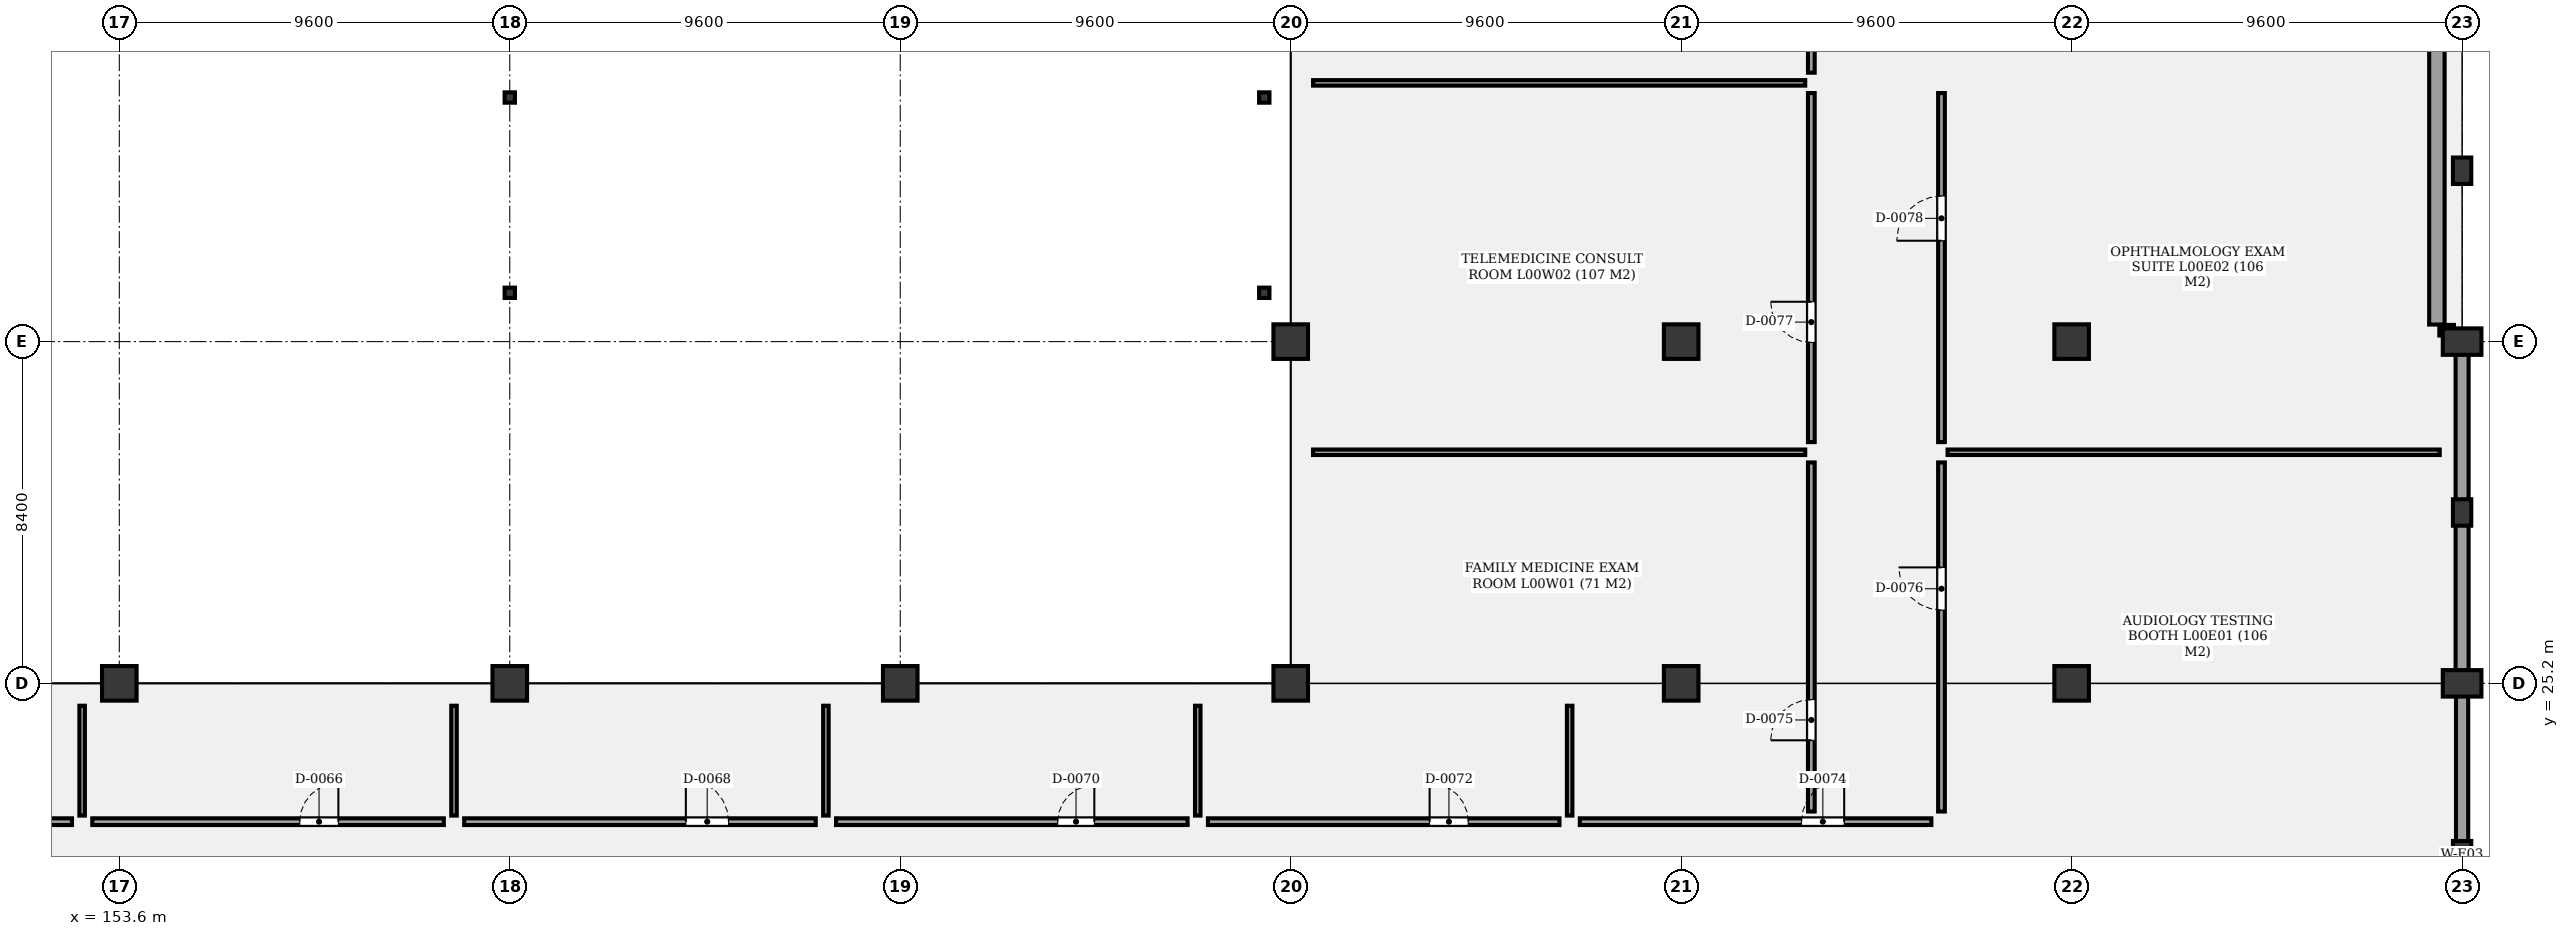
"""IFC4 building model, lengths in metres.
Left out: names, types, materials, properties, quantities, classifications, styles, units other than length and angle.
Written with IfcOpenShell. Run it as: python <this file> out.ifc"""

import sys

from ifc_helpers import new_model, si_unit, direction, frame, frame_2d, origin, origin_2d, place, context, subcontext, project, spatial, rectangle, hollow_rectangle, extrude, element, fill, save


model = new_model("IFC4")
c1 = context("Model", 3, precision=1e-05, world=origin(), true_north=direction((0.0, 1.0)))
c2 = subcontext(c1, "Body", "Model", "MODEL_VIEW")
j1 = project(units=[si_unit("LENGTHUNIT", "METRE"), si_unit("PLANEANGLEUNIT", "RADIAN")], contexts=[c1])
p1 = place(None, origin())
s1 = spatial("IfcSite", under=j1, at=p1, CompositionType="ELEMENT")
p2 = place(p1, origin())
s2 = spatial("IfcBuilding", under=s1, at=p2, CompositionType="ELEMENT")
p3 = place(p2, origin())
s3 = spatial("IfcBuildingStorey", under=s2, at=p3, CompositionType="ELEMENT", Elevation=0.0)
for number, where, z_axis, x_axis in (
    (1, (153.6, 25.2, -0.35), (0.0, 0.0, 1.0), (1.0, 0.0, 0.0)),
    (2, (163.2, 25.2, -0.35), (0.0, 0.0, 1.0), (1.0, 0.0, 0.0)),
):
    element("IfcColumn", number, at=place(p3, frame(where, z_axis=z_axis, x_axis=x_axis)), inside=s3, PredefinedType="COLUMN", context=c2, shape_type="SweptSolid", body=[
        extrude(rectangle(XDim=0.85, YDim=0.85, at=origin_2d()), origin(), (0.0, 0.0, 1.0), 5.45),
    ])
for number, where, z_axis, x_axis in (
    (3, (163.2, 34.8, -0.35), (0.0, 0.0, 1.0), (1.0, 0.0, 0.0)),
    (4, (163.2, 39.6, -0.35), (0.0, 0.0, 1.0), (1.0, 0.0, 0.0)),
):
    element("IfcColumn", number, at=place(p3, frame(where, z_axis=z_axis, x_axis=x_axis)), inside=s3, PredefinedType="COLUMN", context=c2, shape_type="SweptSolid", body=[
        extrude(hollow_rectangle(XDim=0.254, YDim=0.254, WallThickness=0.013, at=origin_2d()), origin(), (0.0, 0.0, 1.0), 5.45),
    ])
p4 = place(p3, frame((172.8, 25.2, -0.35), z_axis=(0.0, 0.0, 1.0), x_axis=(1.0, 0.0, 0.0)))
e5 = element("IfcColumn", 5, at=p4, inside=s3, PredefinedType="COLUMN", context=c2, shape_type="SweptSolid", body=[
    extrude(rectangle(XDim=0.85, YDim=0.85, at=origin_2d()), origin(), (0.0, 0.0, 1.0), 5.45),
])
for number, where, z_axis, x_axis in (
    (6, (181.75, 34.8, -0.35), (0.0, 0.0, 1.0), (1.0, 0.0, 0.0)),
    (7, (181.75, 39.6, -0.35), (0.0, 0.0, 1.0), (1.0, 0.0, 0.0)),
):
    element("IfcColumn", number, at=place(p3, frame(where, z_axis=z_axis, x_axis=x_axis)), inside=s3, PredefinedType="COLUMN", context=c2, shape_type="SweptSolid", body=[
        extrude(hollow_rectangle(XDim=0.254, YDim=0.254, WallThickness=0.013, at=origin_2d()), origin(), (0.0, 0.0, 1.0), 5.45),
    ])
for number, where, z_axis, x_axis in (
    (8, (182.4, 25.2, -0.35), (0.0, 0.0, 1.0), (1.0, 0.0, 0.0)),
    (9, (182.4, 33.6, -0.35), (0.0, 0.0, 1.0), (1.0, 0.0, 0.0)),
    (10, (192.0, 25.2, -0.35), (0.0, 0.0, 1.0), (1.0, 0.0, 0.0)),
    (11, (192.0, 33.6, -0.35), (0.0, 0.0, 1.0), (1.0, 0.0, 0.0)),
    (12, (201.6, 25.2, -0.35), (0.0, 0.0, 1.0), (1.0, 0.0, 0.0)),
    (13, (201.6, 33.6, -0.35), (0.0, 0.0, 1.0), (1.0, 0.0, 0.0)),
):
    element("IfcColumn", number, at=place(p3, frame(where, z_axis=z_axis, x_axis=x_axis)), inside=s3, PredefinedType="COLUMN", context=c2, shape_type="SweptSolid", body=[
        extrude(rectangle(XDim=0.85, YDim=0.85, at=origin_2d()), origin(), (0.0, 0.0, 1.0), 5.45),
    ])
for number, where, z_axis, x_axis in (
    (14, (211.2, 25.2, -0.35), (0.0, 0.0, 1.0), (0.0, 1.0, 0.0)),
    (15, (211.2, 33.6, -0.35), (0.0, 0.0, 1.0), (0.0, 1.0, 0.0)),
):
    element("IfcColumn", number, at=place(p3, frame(where, z_axis=z_axis, x_axis=x_axis)), inside=s3, PredefinedType="COLUMN", context=c2, shape_type="SweptSolid", body=[
        extrude(rectangle(XDim=0.95, YDim=0.65, at=origin_2d()), origin(), (0.0, 0.0, 1.0), 5.45),
    ])
for number, where, z_axis, x_axis in (
    (16, (211.2, 21.0, 0.0), (0.0, 0.0, 1.0), (1.0, 0.0, 0.0)),
    (17, (211.2, 29.4, 0.0), (0.0, 0.0, 1.0), (1.0, 0.0, 0.0)),
    (18, (211.2, 37.8, 0.0), (0.0, 0.0, 1.0), (1.0, 0.0, 0.0)),
):
    element("IfcColumn", number, at=place(p3, frame(where, z_axis=z_axis, x_axis=x_axis)), inside=s3, PredefinedType="PILASTER", context=c2, shape_type="SweptSolid", body=[
        extrude(rectangle(XDim=0.45, YDim=0.65, at=origin_2d()), origin(), (0.0, 0.0, 1.0), 5.1),
    ])
p5 = place(p3, frame((211.2, 25.2, 0.0), z_axis=(0.0, 0.0, 1.0), x_axis=(0.0, -1.0, 0.0)))
e19 = element("IfcWall", 19, at=p5, inside=s3, PredefinedType="SOLIDWALL", context=c2, shape_type="SweptSolid", body=[
    extrude(rectangle(XDim=8.4, YDim=0.3, at=frame_2d((4.2, 0.0))), origin(), (0.0, 0.0, 1.0), 4.24),
])
p6 = place(p3, frame((211.2, 33.6, 0.0), z_axis=(0.0, 0.0, 1.0), x_axis=(0.0, -1.0, 0.0)))
e20 = element("IfcWall", 20, at=p6, inside=s3, PredefinedType="SOLIDWALL", context=c2, shape_type="SweptSolid", body=[
    extrude(rectangle(XDim=8.4, YDim=0.32, at=frame_2d((4.2, 0.0))), origin(), (0.0, 0.0, 1.0), 4.24),
])
p7 = place(p3, frame((211.0, 33.88, 0.0), z_axis=(0.0, 0.0, 1.0), x_axis=(-1.0, 0.0, 0.0)))
e21 = element("IfcWall", 21, at=p7, inside=s3, PredefinedType="SOLIDWALL", context=c2, shape_type="SweptSolid", body=[
    extrude(rectangle(XDim=0.36, YDim=0.26, at=frame_2d((0.18, 0.0))), origin(), (0.0, 0.0, 1.0), 4.24),
])
p8 = place(p3, frame((210.58, 41.58, 0.0), z_axis=(0.0, 0.0, 1.0), x_axis=(0.0, -1.0, 0.0)))
e22 = element("IfcWall", 22, at=p8, inside=s3, PredefinedType="SOLIDWALL", context=c2, shape_type="SweptSolid", body=[
    extrude(rectangle(XDim=7.56, YDim=0.38, at=frame_2d((3.78, 0.0))), origin(), (0.0, 0.0, 1.0), 4.24),
])
p9 = place(p3, frame((143.793, 21.8, 0.0), z_axis=(0.0, 0.0, 1.0), x_axis=(1.0, 0.0, 0.0)))
e23 = element("IfcWall", 23, at=p9, inside=s3, PredefinedType="PARTITIONING", context=c2, shape_type="SweptSolid", body=[
    extrude(rectangle(XDim=8.643, YDim=0.165, at=frame_2d((4.322, 0.0))), origin(), (0.0, 0.0, 1.0), 3.98),
])
p10 = place(p9, frame((4.75, 0.0, 0.0)))
e24 = element("IfcOpeningElement", 24, at=p10, cuts=e23, PredefinedType="OPENING", context=c2, shape_type="SweptSolid", body=[
    extrude(rectangle(XDim=0.9, YDim=2.1, at=frame_2d((0.45, 1.05))), frame((0.0, 0.093, 0.0), z_axis=(0.0, -1.0, 0.0), x_axis=(1.0, 0.0, 0.0)), (0.0, 0.0, 1.0), 0.185),
])
p11 = place(p3, frame((152.936, 21.8, 0.0), z_axis=(0.0, 0.0, 1.0), x_axis=(1.0, 0.0, 0.0)))
e25 = element("IfcWall", 25, at=p11, inside=s3, PredefinedType="PARTITIONING", context=c2, shape_type="SweptSolid", body=[
    extrude(rectangle(XDim=8.643, YDim=0.165, at=frame_2d((4.322, 0.0))), origin(), (0.0, 0.0, 1.0), 3.98),
])
p12 = place(p11, frame((5.1, 0.0, 0.0)))
e26 = element("IfcOpeningElement", 26, at=p12, cuts=e25, PredefinedType="OPENING", context=c2, shape_type="SweptSolid", body=[
    extrude(rectangle(XDim=0.95, YDim=2.1, at=frame_2d((0.475, 1.05))), frame((0.0, 0.093, 0.0), z_axis=(0.0, -1.0, 0.0), x_axis=(1.0, 0.0, 0.0)), (0.0, 0.0, 1.0), 0.185),
])
p13 = place(p3, frame((152.686, 21.95, 0.0), z_axis=(0.0, 0.0, 1.0), x_axis=(0.0, 1.0, 0.0)))
e27 = element("IfcWall", 27, at=p13, inside=s3, PredefinedType="PARTITIONING", context=c2, shape_type="SweptSolid", body=[
    extrude(rectangle(XDim=2.7, YDim=0.135, at=frame_2d((1.35, 0.0))), origin(), (0.0, 0.0, 1.0), 3.98),
])
p14 = place(p3, frame((162.079, 21.8, 0.0), z_axis=(0.0, 0.0, 1.0), x_axis=(1.0, 0.0, 0.0)))
e28 = element("IfcWall", 28, at=p14, inside=s3, PredefinedType="PARTITIONING", context=c2, shape_type="SweptSolid", body=[
    extrude(rectangle(XDim=8.643, YDim=0.165, at=frame_2d((4.321, 0.0))), origin(), (0.0, 0.0, 1.0), 3.98),
])
p15 = place(p14, frame((5.45, 0.0, 0.0)))
e29 = element("IfcOpeningElement", 29, at=p15, cuts=e28, PredefinedType="OPENING", context=c2, shape_type="SweptSolid", body=[
    extrude(rectangle(XDim=1.05, YDim=2.1, at=frame_2d((0.525, 1.05))), frame((0.0, 0.093, 0.0), z_axis=(0.0, -1.0, 0.0), x_axis=(1.0, 0.0, 0.0)), (0.0, 0.0, 1.0), 0.185),
])
p16 = place(p3, frame((161.829, 21.95, 0.0), z_axis=(0.0, 0.0, 1.0), x_axis=(0.0, 1.0, 0.0)))
e30 = element("IfcWall", 30, at=p16, inside=s3, PredefinedType="PARTITIONING", context=c2, shape_type="SweptSolid", body=[
    extrude(rectangle(XDim=2.7, YDim=0.135, at=frame_2d((1.35, 0.0))), origin(), (0.0, 0.0, 1.0), 3.98),
])
p17 = place(p3, frame((171.222, 21.8, 0.0), z_axis=(0.0, 0.0, 1.0), x_axis=(1.0, 0.0, 0.0)))
e31 = element("IfcWall", 31, at=p17, inside=s3, PredefinedType="PARTITIONING", context=c2, shape_type="SweptSolid", body=[
    extrude(rectangle(XDim=8.643, YDim=0.165, at=frame_2d((4.322, 0.0))), origin(), (0.0, 0.0, 1.0), 3.98),
])
p18 = place(p17, frame((5.45, 0.0, 0.0)))
e32 = element("IfcOpeningElement", 32, at=p18, cuts=e31, PredefinedType="OPENING", context=c2, shape_type="SweptSolid", body=[
    extrude(rectangle(XDim=0.9, YDim=2.1, at=frame_2d((0.45, 1.05))), frame((0.0, 0.093, 0.0), z_axis=(0.0, -1.0, 0.0), x_axis=(1.0, 0.0, 0.0)), (0.0, 0.0, 1.0), 0.185),
])
p19 = place(p3, frame((170.972, 21.95, 0.0), z_axis=(0.0, 0.0, 1.0), x_axis=(0.0, 1.0, 0.0)))
e33 = element("IfcWall", 33, at=p19, inside=s3, PredefinedType="PARTITIONING", context=c2, shape_type="SweptSolid", body=[
    extrude(rectangle(XDim=2.7, YDim=0.135, at=frame_2d((1.35, 0.0))), origin(), (0.0, 0.0, 1.0), 3.98),
])
p20 = place(p3, frame((180.365, 21.8, 0.0), z_axis=(0.0, 0.0, 1.0), x_axis=(1.0, 0.0, 0.0)))
e34 = element("IfcWall", 34, at=p20, inside=s3, PredefinedType="PARTITIONING", context=c2, shape_type="SweptSolid", body=[
    extrude(rectangle(XDim=8.643, YDim=0.165, at=frame_2d((4.322, 0.0))), origin(), (0.0, 0.0, 1.0), 3.98),
])
p21 = place(p20, frame((5.45, 0.0, 0.0)))
e35 = element("IfcOpeningElement", 35, at=p21, cuts=e34, PredefinedType="OPENING", context=c2, shape_type="SweptSolid", body=[
    extrude(rectangle(XDim=0.95, YDim=2.1, at=frame_2d((0.475, 1.05))), frame((0.0, 0.093, 0.0), z_axis=(0.0, -1.0, 0.0), x_axis=(1.0, 0.0, 0.0)), (0.0, 0.0, 1.0), 0.185),
])
p22 = place(p3, frame((180.115, 21.95, 0.0), z_axis=(0.0, 0.0, 1.0), x_axis=(0.0, 1.0, 0.0)))
e36 = element("IfcWall", 36, at=p22, inside=s3, PredefinedType="PARTITIONING", context=c2, shape_type="SweptSolid", body=[
    extrude(rectangle(XDim=2.7, YDim=0.135, at=frame_2d((1.35, 0.0))), origin(), (0.0, 0.0, 1.0), 3.98),
])
p23 = place(p3, frame((189.508, 21.8, 0.0), z_axis=(0.0, 0.0, 1.0), x_axis=(1.0, 0.0, 0.0)))
e37 = element("IfcWall", 37, at=p23, inside=s3, PredefinedType="PARTITIONING", context=c2, shape_type="SweptSolid", body=[
    extrude(rectangle(XDim=8.643, YDim=0.165, at=frame_2d((4.321, 0.0))), origin(), (0.0, 0.0, 1.0), 3.98),
])
p24 = place(p23, frame((5.45, 0.0, 0.0)))
e38 = element("IfcOpeningElement", 38, at=p24, cuts=e37, PredefinedType="OPENING", context=c2, shape_type="SweptSolid", body=[
    extrude(rectangle(XDim=1.05, YDim=2.1, at=frame_2d((0.525, 1.05))), frame((0.0, 0.093, 0.0), z_axis=(0.0, -1.0, 0.0), x_axis=(1.0, 0.0, 0.0)), (0.0, 0.0, 1.0), 0.185),
])
p25 = place(p3, frame((189.258, 21.95, 0.0), z_axis=(0.0, 0.0, 1.0), x_axis=(0.0, 1.0, 0.0)))
e39 = element("IfcWall", 39, at=p25, inside=s3, PredefinedType="PARTITIONING", context=c2, shape_type="SweptSolid", body=[
    extrude(rectangle(XDim=2.7, YDim=0.135, at=frame_2d((1.35, 0.0))), origin(), (0.0, 0.0, 1.0), 3.98),
])
p26 = place(p3, frame((195.2, 22.05, 0.0), z_axis=(0.0, 0.0, 1.0), x_axis=(0.0, 1.0, 0.0)))
e40 = element("IfcWall", 40, at=p26, inside=s3, PredefinedType="PARTITIONING", context=c2, shape_type="SweptSolid", body=[
    extrude(rectangle(XDim=8.58, YDim=0.165, at=frame_2d((4.29, 0.0))), origin(), (0.0, 0.0, 1.0), 3.98),
])
p27 = place(p26, frame((1.75, 0.0, 0.0)))
e41 = element("IfcOpeningElement", 41, at=p27, cuts=e40, PredefinedType="OPENING", context=c2, shape_type="SweptSolid", body=[
    extrude(rectangle(XDim=1.0, YDim=2.1, at=frame_2d((0.5, 1.05))), frame((0.0, 0.093, 0.0), z_axis=(0.0, -1.0, 0.0), x_axis=(1.0, 0.0, 0.0)), (0.0, 0.0, 1.0), 0.185),
])
p28 = place(p3, frame((198.4, 22.05, 0.0), z_axis=(0.0, 0.0, 1.0), x_axis=(0.0, 1.0, 0.0)))
e42 = element("IfcWall", 42, at=p28, inside=s3, PredefinedType="PARTITIONING", context=c2, shape_type="SweptSolid", body=[
    extrude(rectangle(XDim=8.58, YDim=0.165, at=frame_2d((4.29, 0.0))), origin(), (0.0, 0.0, 1.0), 3.98),
])
p29 = place(p28, frame((4.95, 0.0, 0.0)))
e43 = element("IfcOpeningElement", 43, at=p29, cuts=e42, PredefinedType="OPENING", context=c2, shape_type="SweptSolid", body=[
    extrude(rectangle(XDim=1.05, YDim=2.1, at=frame_2d((0.525, 1.05))), frame((0.0, 0.093, 0.0), z_axis=(0.0, -1.0, 0.0), x_axis=(1.0, 0.0, 0.0)), (0.0, 0.0, 1.0), 0.185),
])
p30 = place(p3, frame((195.2, 31.13, 0.0), z_axis=(0.0, 0.0, 1.0), x_axis=(0.0, 1.0, 0.0)))
e44 = element("IfcWall", 44, at=p30, inside=s3, PredefinedType="PARTITIONING", context=c2, shape_type="SweptSolid", body=[
    extrude(rectangle(XDim=8.58, YDim=0.165, at=frame_2d((4.29, 0.0))), origin(), (0.0, 0.0, 1.0), 3.98),
])
p31 = place(p30, frame((2.45, 0.0, 0.0)))
e45 = element("IfcOpeningElement", 45, at=p31, cuts=e44, PredefinedType="OPENING", context=c2, shape_type="SweptSolid", body=[
    extrude(rectangle(XDim=1.0, YDim=2.2, at=frame_2d((0.5, 1.1))), frame((0.0, 0.093, 0.0), z_axis=(0.0, -1.0, 0.0), x_axis=(1.0, 0.0, 0.0)), (0.0, 0.0, 1.0), 0.185),
])
p32 = place(p3, frame((182.95, 30.88, 0.0), z_axis=(0.0, 0.0, 1.0), x_axis=(1.0, 0.0, 0.0)))
e46 = element("IfcWall", 46, at=p32, inside=s3, PredefinedType="PARTITIONING", context=c2, shape_type="SweptSolid", body=[
    extrude(rectangle(XDim=12.1, YDim=0.135, at=frame_2d((6.05, 0.0))), origin(), (0.0, 0.0, 1.0), 3.98),
])
p33 = place(p3, frame((198.4, 31.13, 0.0), z_axis=(0.0, 0.0, 1.0), x_axis=(0.0, 1.0, 0.0)))
e47 = element("IfcWall", 47, at=p33, inside=s3, PredefinedType="PARTITIONING", context=c2, shape_type="SweptSolid", body=[
    extrude(rectangle(XDim=8.58, YDim=0.165, at=frame_2d((4.29, 0.0))), origin(), (0.0, 0.0, 1.0), 3.98),
])
p34 = place(p33, frame((4.95, 0.0, 0.0)))
e48 = element("IfcOpeningElement", 48, at=p34, cuts=e47, PredefinedType="OPENING", context=c2, shape_type="SweptSolid", body=[
    extrude(rectangle(XDim=1.1, YDim=2.1, at=frame_2d((0.55, 1.05))), frame((0.0, 0.093, 0.0), z_axis=(0.0, -1.0, 0.0), x_axis=(1.0, 0.0, 0.0)), (0.0, 0.0, 1.0), 0.185),
])
p35 = place(p3, frame((198.55, 30.88, 0.0), z_axis=(0.0, 0.0, 1.0), x_axis=(1.0, 0.0, 0.0)))
e49 = element("IfcWall", 49, at=p35, inside=s3, PredefinedType="PARTITIONING", context=c2, shape_type="SweptSolid", body=[
    extrude(rectangle(XDim=12.1, YDim=0.135, at=frame_2d((6.05, 0.0))), origin(), (0.0, 0.0, 1.0), 3.98),
])
p36 = place(p3, frame((195.2, 40.21, 0.0), z_axis=(0.0, 0.0, 1.0), x_axis=(0.0, 1.0, 0.0)))
e50 = element("IfcWall", 50, at=p36, inside=s3, PredefinedType="PARTITIONING", context=c2, shape_type="SweptSolid", body=[
    extrude(rectangle(XDim=8.58, YDim=0.165, at=frame_2d((4.29, 0.0))), origin(), (0.0, 0.0, 1.0), 3.98),
])
p37 = place(p36, frame((2.45, 0.0, 0.0)))
e51 = element("IfcOpeningElement", 51, at=p37, cuts=e50, PredefinedType="OPENING", context=c2, shape_type="SweptSolid", body=[
    extrude(rectangle(XDim=1.0, YDim=2.1, at=frame_2d((0.5, 1.05))), frame((0.0, 0.093, 0.0), z_axis=(0.0, -1.0, 0.0), x_axis=(1.0, 0.0, 0.0)), (0.0, 0.0, 1.0), 0.185),
])
p38 = place(p3, frame((182.95, 39.96, 0.0), z_axis=(0.0, 0.0, 1.0), x_axis=(1.0, 0.0, 0.0)))
e52 = element("IfcWall", 52, at=p38, inside=s3, PredefinedType="PARTITIONING", context=c2, shape_type="SweptSolid", body=[
    extrude(rectangle(XDim=12.1, YDim=0.135, at=frame_2d((6.05, 0.0))), origin(), (0.0, 0.0, 1.0), 3.98),
])
p39 = place(p12, origin())
e53 = element("IfcDoor", 53, at=p39, inside=s3, OperationType="SINGLE_SWING_RIGHT", PredefinedType="DOOR", context=c2, shape_type="SweptSolid", body=[
    extrude(rectangle(XDim=0.95, YDim=2.1, at=frame_2d((0.475, 1.05))), frame((0.0, 0.025, 0.0), z_axis=(0.0, -1.0, 0.0), x_axis=(1.0, 0.0, 0.0)), (0.0, 0.0, 1.0), 0.05),
])
fill(e26, e53)
p40 = place(p15, origin())
e54 = element("IfcDoor", 54, at=p40, inside=s3, OperationType="SINGLE_SWING_LEFT", PredefinedType="DOOR", context=c2, shape_type="SweptSolid", body=[
    extrude(rectangle(XDim=1.05, YDim=2.1, at=frame_2d((0.525, 1.05))), frame((0.0, 0.025, 0.0), z_axis=(0.0, -1.0, 0.0), x_axis=(1.0, 0.0, 0.0)), (0.0, 0.0, 1.0), 0.05),
])
fill(e29, e54)
p41 = place(p18, origin())
e55 = element("IfcDoor", 55, at=p41, inside=s3, OperationType="SINGLE_SWING_RIGHT", PredefinedType="DOOR", context=c2, shape_type="SweptSolid", body=[
    extrude(rectangle(XDim=0.9, YDim=2.1, at=frame_2d((0.45, 1.05))), frame((0.0, 0.025, 0.0), z_axis=(0.0, -1.0, 0.0), x_axis=(1.0, 0.0, 0.0)), (0.0, 0.0, 1.0), 0.05),
])
fill(e32, e55)
p42 = place(p21, origin())
e56 = element("IfcDoor", 56, at=p42, inside=s3, OperationType="SINGLE_SWING_LEFT", PredefinedType="DOOR", context=c2, shape_type="SweptSolid", body=[
    extrude(rectangle(XDim=0.95, YDim=2.1, at=frame_2d((0.475, 1.05))), frame((0.0, 0.025, 0.0), z_axis=(0.0, -1.0, 0.0), x_axis=(1.0, 0.0, 0.0)), (0.0, 0.0, 1.0), 0.05),
])
fill(e35, e56)
p43 = place(p24, origin())
e57 = element("IfcDoor", 57, at=p43, inside=s3, OperationType="SINGLE_SWING_RIGHT", PredefinedType="DOOR", context=c2, shape_type="SweptSolid", body=[
    extrude(rectangle(XDim=1.05, YDim=2.1, at=frame_2d((0.525, 1.05))), frame((0.0, 0.025, 0.0), z_axis=(0.0, -1.0, 0.0), x_axis=(1.0, 0.0, 0.0)), (0.0, 0.0, 1.0), 0.05),
])
fill(e38, e57)
p44 = place(p27, origin())
e58 = element("IfcDoor", 58, at=p44, inside=s3, OperationType="SINGLE_SWING_LEFT", PredefinedType="DOOR", context=c2, shape_type="SweptSolid", body=[
    extrude(rectangle(XDim=1.0, YDim=2.1, at=frame_2d((0.5, 1.05))), frame((0.0, 0.025, 0.0), z_axis=(0.0, -1.0, 0.0), x_axis=(1.0, 0.0, 0.0)), (0.0, 0.0, 1.0), 0.05),
])
fill(e41, e58)
p45 = place(p29, origin())
e59 = element("IfcDoor", 59, at=p45, inside=s3, OperationType="SINGLE_SWING_RIGHT", PredefinedType="DOOR", context=c2, shape_type="SweptSolid", body=[
    extrude(rectangle(XDim=1.05, YDim=2.1, at=frame_2d((0.525, 1.05))), frame((0.0, 0.025, 0.0), z_axis=(0.0, -1.0, 0.0), x_axis=(1.0, 0.0, 0.0)), (0.0, 0.0, 1.0), 0.05),
])
fill(e43, e59)
p46 = place(p31, origin())
e60 = element("IfcDoor", 60, at=p46, inside=s3, OperationType="SINGLE_SWING_RIGHT", PredefinedType="DOOR", context=c2, shape_type="SweptSolid", body=[
    extrude(rectangle(XDim=1.0, YDim=2.2, at=frame_2d((0.5, 1.1))), frame((0.0, 0.025, 0.0), z_axis=(0.0, -1.0, 0.0), x_axis=(1.0, 0.0, 0.0)), (0.0, 0.0, 1.0), 0.05),
])
fill(e45, e60)
p47 = place(p34, origin())
e61 = element("IfcDoor", 61, at=p47, inside=s3, OperationType="SINGLE_SWING_LEFT", PredefinedType="DOOR", context=c2, shape_type="SweptSolid", body=[
    extrude(rectangle(XDim=1.1, YDim=2.1, at=frame_2d((0.55, 1.05))), frame((0.0, 0.025, 0.0), z_axis=(0.0, -1.0, 0.0), x_axis=(1.0, 0.0, 0.0)), (0.0, 0.0, 1.0), 0.05),
])
fill(e48, e61)
save(model, sys.argv[1])
